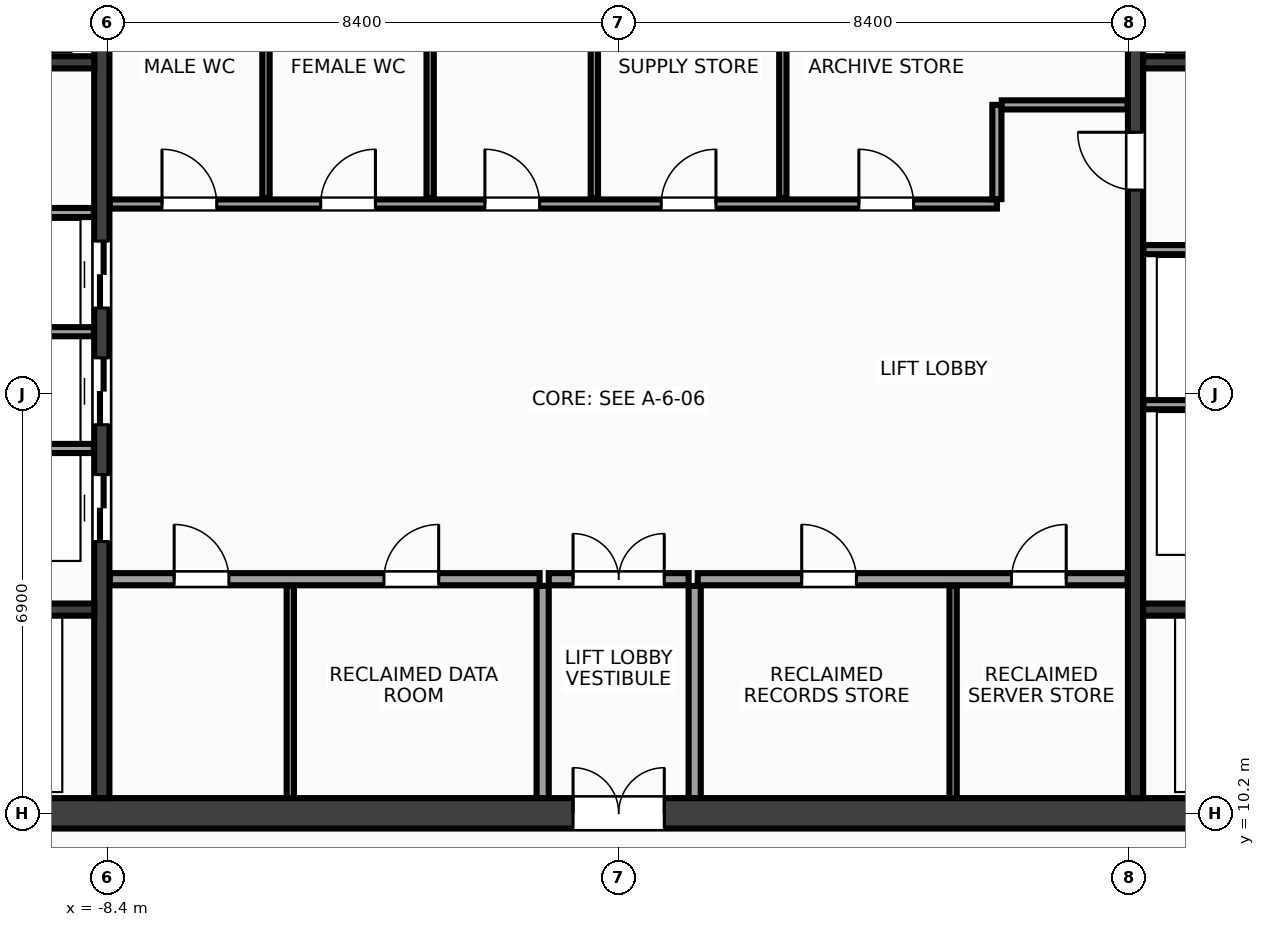
"""IFC4 building model, lengths in metres.
Left out: names, types, materials, properties, quantities, classifications, styles, units other than length and angle.
Written with IfcOpenShell. Run it as: python <this file> out.ifc"""

import sys

from ifc_helpers import new_model, si_unit, direction, frame, frame_2d, origin, place, context, subcontext, project, spatial, rectangle, extrude, source, transform, mapped, element, fill, save


model = new_model("IFC4")
c1 = context("Model", 3, precision=1e-05, world=origin(), true_north=direction((0.0, 1.0)))
c2 = subcontext(c1, "Body", "Model", "MODEL_VIEW")
j1 = project(units=[si_unit("LENGTHUNIT", "METRE"), si_unit("PLANEANGLEUNIT", "RADIAN")], contexts=[c1])
p1 = place(None, origin())
s1 = spatial("IfcSite", under=j1, at=p1, CompositionType="ELEMENT")
p2 = place(p1, origin())
s2 = spatial("IfcBuilding", under=s1, at=p2, CompositionType="ELEMENT")
p3 = place(p2, frame((0.0, 0.0, 257.6)))
s3 = spatial("IfcBuildingStorey", under=s2, at=p3, CompositionType="ELEMENT", Elevation=257.6)
m1 = source(origin(), c2, "Body", "SweptSolid", [
    extrude(rectangle(XDim=31.7, YDim=0.5, at=frame_2d((15.85, 0.0))), origin(), (0.0, 0.0, 1.0), 3.6),
])
p4 = place(p3, frame((-15.85, 10.2, 0.0), z_axis=(0.0, 0.0, 1.0), x_axis=(1.0, 0.0, 0.0)))
e1 = element("IfcWall", 1, at=p4, inside=s3, PredefinedType="SHEAR", context=c2, shape_type="MappedRepresentation", body=[
    mapped(m1, transform((0.0, 0.0, 0.0), x_axis=(1.0, 0.0, 0.0), y_axis=(0.0, 1.0, 0.0), z_axis=(0.0, 0.0, 1.0), scale=1.0)),
])
p5 = place(p4, frame((1.7, 0.0, 0.0)))
e2 = element("IfcOpeningElement", 2, at=p5, cuts=e1, PredefinedType="OPENING", context=c2, shape_type="SweptSolid", body=[
    extrude(rectangle(XDim=1.6, YDim=2.15, at=frame_2d((0.8, 1.075))), frame((0.0, 0.262, 0.0), z_axis=(0.0, -1.0, 0.0), x_axis=(1.0, 0.0, 0.0)), (0.0, 0.0, 1.0), 0.524),
])
p6 = place(p4, frame((28.4, 0.0, 0.0)))
e3 = element("IfcOpeningElement", 3, at=p6, cuts=e1, PredefinedType="OPENING", context=c2, shape_type="SweptSolid", body=[
    extrude(rectangle(XDim=1.6, YDim=2.15, at=frame_2d((0.8, 1.075))), frame((0.0, 0.262, 0.0), z_axis=(0.0, -1.0, 0.0), x_axis=(1.0, 0.0, 0.0)), (0.0, 0.0, 1.0), 0.524),
])
p7 = place(p4, frame((15.1, 0.0, 0.0)))
e4 = element("IfcOpeningElement", 4, at=p7, cuts=e1, PredefinedType="OPENING", context=c2, shape_type="SweptSolid", body=[
    extrude(rectangle(XDim=1.5, YDim=2.2, at=frame_2d((0.75, 1.1))), frame((0.0, 0.262, 0.0), z_axis=(0.0, -1.0, 0.0), x_axis=(1.0, 0.0, 0.0)), (0.0, 0.0, 1.0), 0.524),
])
m2 = source(origin(), c2, "Body", "SweptSolid", [
    extrude(rectangle(XDim=13.1, YDim=0.25, at=frame_2d((6.55, 0.0))), origin(), (0.0, 0.0, 1.0), 3.6),
])
p8 = place(p3, frame((-8.5, 10.45, 0.0), z_axis=(0.0, 0.0, 1.0), x_axis=(0.0, 1.0, 0.0)))
e5 = element("IfcWall", 5, at=p8, inside=s3, PredefinedType="SHEAR", context=c2, shape_type="MappedRepresentation", body=[
    mapped(m2, transform((0.0, 0.0, 0.0), x_axis=(1.0, 0.0, 0.0), y_axis=(0.0, 1.0, 0.0), z_axis=(0.0, 0.0, 1.0), scale=1.0)),
])
p9 = place(p8, frame((4.22, 0.0, 0.0)))
e6 = element("IfcOpeningElement", 6, at=p9, cuts=e5, PredefinedType="OPENING", context=c2, shape_type="SweptSolid", body=[
    extrude(rectangle(XDim=1.1, YDim=2.15, at=frame_2d((0.55, 1.075))), frame((0.0, 0.137, 0.0), z_axis=(0.0, -1.0, 0.0), x_axis=(1.0, 0.0, 0.0)), (0.0, 0.0, 1.0), 0.274),
])
p10 = place(p8, frame((6.14, 0.0, 0.0)))
e7 = element("IfcOpeningElement", 7, at=p10, cuts=e5, PredefinedType="OPENING", context=c2, shape_type="SweptSolid", body=[
    extrude(rectangle(XDim=1.1, YDim=2.15, at=frame_2d((0.55, 1.075))), frame((0.0, 0.137, 0.0), z_axis=(0.0, -1.0, 0.0), x_axis=(1.0, 0.0, 0.0)), (0.0, 0.0, 1.0), 0.274),
])
p11 = place(p8, frame((8.06, 0.0, 0.0)))
e8 = element("IfcOpeningElement", 8, at=p11, cuts=e5, PredefinedType="OPENING", context=c2, shape_type="SweptSolid", body=[
    extrude(rectangle(XDim=1.1, YDim=2.15, at=frame_2d((0.55, 1.075))), frame((0.0, 0.137, 0.0), z_axis=(0.0, -1.0, 0.0), x_axis=(1.0, 0.0, 0.0)), (0.0, 0.0, 1.0), 0.274),
])
p12 = place(p3, frame((8.5, 10.45, 0.0), z_axis=(0.0, 0.0, 1.0), x_axis=(0.0, 1.0, 0.0)))
e9 = element("IfcWall", 9, at=p12, inside=s3, PredefinedType="SHEAR", context=c2, shape_type="MappedRepresentation", body=[
    mapped(m2, transform((0.0, 0.0, 0.0), x_axis=(1.0, 0.0, 0.0), y_axis=(0.0, 1.0, 0.0), z_axis=(0.0, 0.0, 1.0), scale=1.0)),
])
p13 = place(p12, frame((10.0, 0.0, 0.0)))
e10 = element("IfcOpeningElement", 10, at=p13, cuts=e9, PredefinedType="OPENING", context=c2, shape_type="SweptSolid", body=[
    extrude(rectangle(XDim=0.95, YDim=2.15, at=frame_2d((0.475, 1.075))), frame((0.0, 0.137, 0.0), z_axis=(0.0, -1.0, 0.0), x_axis=(1.0, 0.0, 0.0)), (0.0, 0.0, 1.0), 0.274),
])
m3 = source(origin(), c2, "Body", "SweptSolid", [
    extrude(rectangle(XDim=2.825, YDim=0.2, at=frame_2d((1.413, 0.0))), origin(), (0.0, 0.0, 1.0), 3.6),
])
for number, where, z_axis, x_axis in (
    (11, (-11.45, 13.55, 0.0), (0.0, 0.0, 1.0), (1.0, 0.0, 0.0)),
    (12, (8.625, 13.55, 0.0), (0.0, 0.0, 1.0), (1.0, 0.0, 0.0)),
):
    element("IfcWall", number, at=place(p3, frame(where, z_axis=z_axis, x_axis=x_axis)), inside=s3, PredefinedType="SHEAR", context=c2, shape_type="MappedRepresentation", body=[
        mapped(m3, transform((0.0, 0.0, 0.0), x_axis=(1.0, 0.0, 0.0), y_axis=(0.0, 1.0, 0.0), z_axis=(0.0, 0.0, 1.0), scale=1.0)),
    ])
m4 = source(origin(), c2, "Body", "SweptSolid", [
    extrude(rectangle(XDim=3.02, YDim=0.2, at=frame_2d((1.51, 0.0))), origin(), (0.0, 0.0, 1.0), 3.6),
])
for number, where, z_axis, x_axis in (
    (13, (-11.645, 22.55, 0.0), (0.0, 0.0, 1.0), (1.0, 0.0, 0.0)),
    (14, (8.625, 22.55, 0.0), (0.0, 0.0, 1.0), (1.0, 0.0, 0.0)),
):
    element("IfcWall", number, at=place(p3, frame(where, z_axis=z_axis, x_axis=x_axis)), inside=s3, PredefinedType="SHEAR", context=c2, shape_type="MappedRepresentation", body=[
        mapped(m4, transform((0.0, 0.0, 0.0), x_axis=(1.0, 0.0, 0.0), y_axis=(0.0, 1.0, 0.0), z_axis=(0.0, 0.0, 1.0), scale=1.0)),
    ])
m5 = source(origin(), c2, "Body", "SweptSolid", [
    extrude(rectangle(XDim=3.01, YDim=0.15, at=frame_2d((1.505, 0.0))), origin(), (0.0, 0.0, 1.0), 3.37),
])
for number, where, z_axis, x_axis in (
    (15, (-11.64, 16.2, 0.0), (0.0, 0.0, 1.0), (1.0, 0.0, 0.0)),
    (16, (-11.64, 18.12, 0.0), (0.0, 0.0, 1.0), (1.0, 0.0, 0.0)),
    (17, (-11.64, 20.08, 0.0), (0.0, 0.0, 1.0), (1.0, 0.0, 0.0)),
    (18, (8.63, 16.92, 0.0), (0.0, 0.0, 1.0), (1.0, 0.0, 0.0)),
    (19, (8.63, 19.47, 0.0), (0.0, 0.0, 1.0), (1.0, 0.0, 0.0)),
):
    element("IfcWall", number, at=place(p3, frame(where, z_axis=z_axis, x_axis=x_axis)), inside=s3, PredefinedType="PARTITIONING", context=c2, shape_type="MappedRepresentation", body=[
        mapped(m5, transform((0.0, 0.0, 0.0), x_axis=(1.0, 0.0, 0.0), y_axis=(0.0, 1.0, 0.0), z_axis=(0.0, 0.0, 1.0), scale=1.0)),
    ])
m6 = source(origin(), c2, "Body", "SweptSolid", [
    extrude(rectangle(XDim=7.07, YDim=0.2, at=frame_2d((3.535, 0.0))), origin(), (0.0, 0.0, 1.0), 3.37),
])
p14 = place(p3, frame((-8.37, 14.05, 0.0), z_axis=(0.0, 0.0, 1.0), x_axis=(1.0, 0.0, 0.0)))
e20 = element("IfcWall", 20, at=p14, inside=s3, PredefinedType="PARTITIONING", context=c2, shape_type="MappedRepresentation", body=[
    mapped(m6, transform((0.0, 0.0, 0.0), x_axis=(1.0, 0.0, 0.0), y_axis=(0.0, 1.0, 0.0), z_axis=(0.0, 0.0, 1.0), scale=1.0)),
])
p15 = place(p14, frame((1.06, 0.0, 0.0)))
e21 = element("IfcOpeningElement", 21, at=p15, cuts=e20, PredefinedType="OPENING", context=c2, shape_type="SweptSolid", body=[
    extrude(rectangle(XDim=0.9, YDim=2.15, at=frame_2d((0.45, 1.075))), frame((0.0, 0.112, 0.0), z_axis=(0.0, -1.0, 0.0), x_axis=(1.0, 0.0, 0.0)), (0.0, 0.0, 1.0), 0.224),
])
p16 = place(p14, frame((4.51, 0.0, 0.0)))
e22 = element("IfcOpeningElement", 22, at=p16, cuts=e20, PredefinedType="OPENING", context=c2, shape_type="SweptSolid", body=[
    extrude(rectangle(XDim=0.9, YDim=2.15, at=frame_2d((0.45, 1.075))), frame((0.0, 0.112, 0.0), z_axis=(0.0, -1.0, 0.0), x_axis=(1.0, 0.0, 0.0)), (0.0, 0.0, 1.0), 0.224),
])
p17 = place(p3, frame((1.3, 14.05, 0.0), z_axis=(0.0, 0.0, 1.0), x_axis=(1.0, 0.0, 0.0)))
e23 = element("IfcWall", 23, at=p17, inside=s3, PredefinedType="PARTITIONING", context=c2, shape_type="MappedRepresentation", body=[
    mapped(m6, transform((0.0, 0.0, 0.0), x_axis=(1.0, 0.0, 0.0), y_axis=(0.0, 1.0, 0.0), z_axis=(0.0, 0.0, 1.0), scale=1.0)),
])
p18 = place(p17, frame((1.71, 0.0, 0.0)))
e24 = element("IfcOpeningElement", 24, at=p18, cuts=e23, PredefinedType="OPENING", context=c2, shape_type="SweptSolid", body=[
    extrude(rectangle(XDim=0.9, YDim=2.15, at=frame_2d((0.45, 1.075))), frame((0.0, 0.112, 0.0), z_axis=(0.0, -1.0, 0.0), x_axis=(1.0, 0.0, 0.0)), (0.0, 0.0, 1.0), 0.224),
])
p19 = place(p17, frame((5.16, 0.0, 0.0)))
e25 = element("IfcOpeningElement", 25, at=p19, cuts=e23, PredefinedType="OPENING", context=c2, shape_type="SweptSolid", body=[
    extrude(rectangle(XDim=0.9, YDim=2.15, at=frame_2d((0.45, 1.075))), frame((0.0, 0.112, 0.0), z_axis=(0.0, -1.0, 0.0), x_axis=(1.0, 0.0, 0.0)), (0.0, 0.0, 1.0), 0.224),
])
m7 = source(origin(), c2, "Body", "SweptSolid", [
    extrude(rectangle(XDim=3.49, YDim=0.2, at=frame_2d((1.745, 0.0))), origin(), (0.0, 0.0, 1.0), 3.37),
])
for number, where, z_axis, x_axis in (
    (26, (-1.25, 10.45, 0.0), (0.0, 0.0, 1.0), (0.0, 1.0, 0.0)),
    (27, (1.25, 10.45, 0.0), (0.0, 0.0, 1.0), (0.0, 1.0, 0.0)),
):
    element("IfcWall", number, at=place(p3, frame(where, z_axis=z_axis, x_axis=x_axis)), inside=s3, PredefinedType="PARTITIONING", context=c2, shape_type="MappedRepresentation", body=[
        mapped(m7, transform((0.0, 0.0, 0.0), x_axis=(1.0, 0.0, 0.0), y_axis=(0.0, 1.0, 0.0), z_axis=(0.0, 0.0, 1.0), scale=1.0)),
    ])
m8 = source(origin(), c2, "Body", "SweptSolid", [
    extrude(rectangle(XDim=2.3, YDim=0.2, at=frame_2d((1.15, 0.0))), origin(), (0.0, 0.0, 1.0), 3.37),
])
p20 = place(p3, frame((-1.15, 14.05, 0.0), z_axis=(0.0, 0.0, 1.0), x_axis=(1.0, 0.0, 0.0)))
e28 = element("IfcWall", 28, at=p20, inside=s3, PredefinedType="PARTITIONING", context=c2, shape_type="MappedRepresentation", body=[
    mapped(m8, transform((0.0, 0.0, 0.0), x_axis=(1.0, 0.0, 0.0), y_axis=(0.0, 1.0, 0.0), z_axis=(0.0, 0.0, 1.0), scale=1.0)),
])
p21 = place(p20, frame((0.4, 0.0, 0.0)))
e29 = element("IfcOpeningElement", 29, at=p21, cuts=e28, PredefinedType="OPENING", context=c2, shape_type="SweptSolid", body=[
    extrude(rectangle(XDim=1.5, YDim=2.2, at=frame_2d((0.75, 1.1))), frame((0.0, 0.112, 0.0), z_axis=(0.0, -1.0, 0.0), x_axis=(1.0, 0.0, 0.0)), (0.0, 0.0, 1.0), 0.224),
])
m9 = source(origin(), c2, "Body", "SweptSolid", [
    extrude(rectangle(XDim=14.59, YDim=0.15, at=frame_2d((7.295, 0.0))), origin(), (0.0, 0.0, 1.0), 3.37),
])
p22 = place(p3, frame((-8.37, 20.22, 0.0), z_axis=(0.0, 0.0, 1.0), x_axis=(1.0, 0.0, 0.0)))
e30 = element("IfcWall", 30, at=p22, inside=s3, PredefinedType="PARTITIONING", context=c2, shape_type="MappedRepresentation", body=[
    mapped(m9, transform((0.0, 0.0, 0.0), x_axis=(1.0, 0.0, 0.0), y_axis=(0.0, 1.0, 0.0), z_axis=(0.0, 0.0, 1.0), scale=1.0)),
])
p23 = place(p22, frame((0.86, 0.0, 0.0)))
e31 = element("IfcOpeningElement", 31, at=p23, cuts=e30, PredefinedType="OPENING", context=c2, shape_type="SweptSolid", body=[
    extrude(rectangle(XDim=0.9, YDim=2.15, at=frame_2d((0.45, 1.075))), frame((0.0, 0.087, 0.0), z_axis=(0.0, -1.0, 0.0), x_axis=(1.0, 0.0, 0.0)), (0.0, 0.0, 1.0), 0.174),
])
p24 = place(p22, frame((3.47, 0.0, 0.0)))
e32 = element("IfcOpeningElement", 32, at=p24, cuts=e30, PredefinedType="OPENING", context=c2, shape_type="SweptSolid", body=[
    extrude(rectangle(XDim=0.9, YDim=2.15, at=frame_2d((0.45, 1.075))), frame((0.0, 0.087, 0.0), z_axis=(0.0, -1.0, 0.0), x_axis=(1.0, 0.0, 0.0)), (0.0, 0.0, 1.0), 0.174),
])
p25 = place(p22, frame((6.17, 0.0, 0.0)))
e33 = element("IfcOpeningElement", 33, at=p25, cuts=e30, PredefinedType="OPENING", context=c2, shape_type="SweptSolid", body=[
    extrude(rectangle(XDim=0.9, YDim=2.15, at=frame_2d((0.45, 1.075))), frame((0.0, 0.087, 0.0), z_axis=(0.0, -1.0, 0.0), x_axis=(1.0, 0.0, 0.0)), (0.0, 0.0, 1.0), 0.174),
])
p26 = place(p22, frame((9.07, 0.0, 0.0)))
e34 = element("IfcOpeningElement", 34, at=p26, cuts=e30, PredefinedType="OPENING", context=c2, shape_type="SweptSolid", body=[
    extrude(rectangle(XDim=0.9, YDim=2.15, at=frame_2d((0.45, 1.075))), frame((0.0, 0.087, 0.0), z_axis=(0.0, -1.0, 0.0), x_axis=(1.0, 0.0, 0.0)), (0.0, 0.0, 1.0), 0.174),
])
p27 = place(p22, frame((12.32, 0.0, 0.0)))
e35 = element("IfcOpeningElement", 35, at=p27, cuts=e30, PredefinedType="OPENING", context=c2, shape_type="SweptSolid", body=[
    extrude(rectangle(XDim=0.9, YDim=2.15, at=frame_2d((0.45, 1.075))), frame((0.0, 0.087, 0.0), z_axis=(0.0, -1.0, 0.0), x_axis=(1.0, 0.0, 0.0)), (0.0, 0.0, 1.0), 0.174),
])
m10 = source(origin(), c2, "Body", "SweptSolid", [
    extrude(rectangle(XDim=1.55, YDim=0.15, at=frame_2d((0.775, 0.0))), origin(), (0.0, 0.0, 1.0), 3.37),
])
p28 = place(p3, frame((6.22, 20.3, 0.0), z_axis=(0.0, 0.0, 1.0), x_axis=(0.0, 1.0, 0.0)))
e36 = element("IfcWall", 36, at=p28, inside=s3, PredefinedType="PARTITIONING", context=c2, shape_type="MappedRepresentation", body=[
    mapped(m10, transform((0.0, 0.0, 0.0), x_axis=(1.0, 0.0, 0.0), y_axis=(0.0, 1.0, 0.0), z_axis=(0.0, 0.0, 1.0), scale=1.0)),
])
m11 = source(origin(), c2, "Body", "SweptSolid", [
    extrude(rectangle(XDim=2.07, YDim=0.15, at=frame_2d((1.035, 0.0))), origin(), (0.0, 0.0, 1.0), 3.37),
])
p29 = place(p3, frame((6.3, 21.85, 0.0), z_axis=(0.0, 0.0, 1.0), x_axis=(1.0, 0.0, 0.0)))
e37 = element("IfcWall", 37, at=p29, inside=s3, PredefinedType="PARTITIONING", context=c2, shape_type="MappedRepresentation", body=[
    mapped(m11, transform((0.0, 0.0, 0.0), x_axis=(1.0, 0.0, 0.0), y_axis=(0.0, 1.0, 0.0), z_axis=(0.0, 0.0, 1.0), scale=1.0)),
])
m12 = source(origin(), c2, "Body", "SweptSolid", [
    extrude(rectangle(XDim=3.49, YDim=0.12, at=frame_2d((1.745, 0.0))), origin(), (0.0, 0.0, 1.0), 3.37),
])
for number, where, z_axis, x_axis in (
    (38, (-5.4, 10.45, 0.0), (0.0, 0.0, 1.0), (0.0, 1.0, 0.0)),
    (39, (5.5, 10.45, 0.0), (0.0, 0.0, 1.0), (0.0, 1.0, 0.0)),
):
    element("IfcWall", number, at=place(p3, frame(where, z_axis=z_axis, x_axis=x_axis)), inside=s3, PredefinedType="PARTITIONING", context=c2, shape_type="MappedRepresentation", body=[
        mapped(m12, transform((0.0, 0.0, 0.0), x_axis=(1.0, 0.0, 0.0), y_axis=(0.0, 1.0, 0.0), z_axis=(0.0, 0.0, 1.0), scale=1.0)),
    ])
m13 = source(origin(), c2, "Body", "SweptSolid", [
    extrude(rectangle(XDim=3.19, YDim=0.12, at=frame_2d((1.595, 0.0))), origin(), (0.0, 0.0, 1.0), 3.37),
])
for number, where, z_axis, x_axis in (
    (40, (-5.8, 20.32, 0.0), (0.0, 0.0, 1.0), (0.0, 1.0, 0.0)),
    (41, (-3.1, 20.32, 0.0), (0.0, 0.0, 1.0), (0.0, 1.0, 0.0)),
    (42, (-0.4, 20.32, 0.0), (0.0, 0.0, 1.0), (0.0, 1.0, 0.0)),
    (43, (2.7, 20.32, 0.0), (0.0, 0.0, 1.0), (0.0, 1.0, 0.0)),
):
    element("IfcWall", number, at=place(p3, frame(where, z_axis=z_axis, x_axis=x_axis)), inside=s3, PredefinedType="PARTITIONING", context=c2, shape_type="MappedRepresentation", body=[
        mapped(m13, transform((0.0, 0.0, 0.0), x_axis=(1.0, 0.0, 0.0), y_axis=(0.0, 1.0, 0.0), z_axis=(0.0, 0.0, 1.0), scale=1.0)),
    ])
m14 = source(origin(), c2, "Body", "SweptSolid", [
    extrude(rectangle(XDim=1.1, YDim=2.15, at=frame_2d((0.55, 1.075))), frame((0.0, 0.025, 0.0), z_axis=(0.0, -1.0, 0.0), x_axis=(1.0, 0.0, 0.0)), (0.0, 0.0, 1.0), 0.05),
])
p30 = place(p9, origin())
e44 = element("IfcDoor", 44, at=p30, inside=s3, OperationType="DOUBLE_DOOR_SLIDING", PredefinedType="DOOR", context=c2, shape_type="MappedRepresentation", body=[
    mapped(m14, transform((0.0, 0.0, 0.0), x_axis=(1.0, 0.0, 0.0), y_axis=(0.0, 1.0, 0.0), z_axis=(0.0, 0.0, 1.0), scale=1.0)),
])
fill(e6, e44)
p31 = place(p10, origin())
e45 = element("IfcDoor", 45, at=p31, inside=s3, OperationType="DOUBLE_DOOR_SLIDING", PredefinedType="DOOR", context=c2, shape_type="MappedRepresentation", body=[
    mapped(m14, transform((0.0, 0.0, 0.0), x_axis=(1.0, 0.0, 0.0), y_axis=(0.0, 1.0, 0.0), z_axis=(0.0, 0.0, 1.0), scale=1.0)),
])
fill(e7, e45)
p32 = place(p11, origin())
e46 = element("IfcDoor", 46, at=p32, inside=s3, OperationType="DOUBLE_DOOR_SLIDING", PredefinedType="DOOR", context=c2, shape_type="MappedRepresentation", body=[
    mapped(m14, transform((0.0, 0.0, 0.0), x_axis=(1.0, 0.0, 0.0), y_axis=(0.0, 1.0, 0.0), z_axis=(0.0, 0.0, 1.0), scale=1.0)),
])
fill(e8, e46)
m15 = source(origin(), c2, "Body", "SweptSolid", [
    extrude(rectangle(XDim=0.95, YDim=2.15, at=frame_2d((0.475, 1.075))), frame((0.0, 0.025, 0.0), z_axis=(0.0, -1.0, 0.0), x_axis=(1.0, 0.0, 0.0)), (0.0, 0.0, 1.0), 0.05),
])
p33 = place(p13, origin())
e47 = element("IfcDoor", 47, at=p33, inside=s3, OperationType="SINGLE_SWING_RIGHT", PredefinedType="DOOR", context=c2, shape_type="MappedRepresentation", body=[
    mapped(m15, transform((0.0, 0.0, 0.0), x_axis=(1.0, 0.0, 0.0), y_axis=(0.0, 1.0, 0.0), z_axis=(0.0, 0.0, 1.0), scale=1.0)),
])
fill(e10, e47)
m16 = source(origin(), c2, "Body", "SweptSolid", [
    extrude(rectangle(XDim=0.9, YDim=2.15, at=frame_2d((0.45, 1.075))), frame((0.0, 0.025, 0.0), z_axis=(0.0, -1.0, 0.0), x_axis=(1.0, 0.0, 0.0)), (0.0, 0.0, 1.0), 0.05),
])
p34 = place(p15, origin())
e48 = element("IfcDoor", 48, at=p34, inside=s3, OperationType="SINGLE_SWING_LEFT", PredefinedType="DOOR", context=c2, shape_type="MappedRepresentation", body=[
    mapped(m16, transform((0.0, 0.0, 0.0), x_axis=(1.0, 0.0, 0.0), y_axis=(0.0, 1.0, 0.0), z_axis=(0.0, 0.0, 1.0), scale=1.0)),
])
fill(e21, e48)
p35 = place(p16, origin())
e49 = element("IfcDoor", 49, at=p35, inside=s3, OperationType="SINGLE_SWING_RIGHT", PredefinedType="DOOR", context=c2, shape_type="MappedRepresentation", body=[
    mapped(m16, transform((0.0, 0.0, 0.0), x_axis=(1.0, 0.0, 0.0), y_axis=(0.0, 1.0, 0.0), z_axis=(0.0, 0.0, 1.0), scale=1.0)),
])
fill(e22, e49)
p36 = place(p18, origin())
e50 = element("IfcDoor", 50, at=p36, inside=s3, OperationType="SINGLE_SWING_LEFT", PredefinedType="DOOR", context=c2, shape_type="MappedRepresentation", body=[
    mapped(m16, transform((0.0, 0.0, 0.0), x_axis=(1.0, 0.0, 0.0), y_axis=(0.0, 1.0, 0.0), z_axis=(0.0, 0.0, 1.0), scale=1.0)),
])
fill(e24, e50)
p37 = place(p19, origin())
e51 = element("IfcDoor", 51, at=p37, inside=s3, OperationType="SINGLE_SWING_RIGHT", PredefinedType="DOOR", context=c2, shape_type="MappedRepresentation", body=[
    mapped(m16, transform((0.0, 0.0, 0.0), x_axis=(1.0, 0.0, 0.0), y_axis=(0.0, 1.0, 0.0), z_axis=(0.0, 0.0, 1.0), scale=1.0)),
])
fill(e25, e51)
m17 = source(origin(), c2, "Body", "SweptSolid", [
    extrude(rectangle(XDim=1.5, YDim=2.2, at=frame_2d((0.75, 1.1))), frame((0.0, 0.025, 0.0), z_axis=(0.0, -1.0, 0.0), x_axis=(1.0, 0.0, 0.0)), (0.0, 0.0, 1.0), 0.05),
])
p38 = place(p21, origin())
e52 = element("IfcDoor", 52, at=p38, inside=s3, OperationType="DOUBLE_DOOR_SINGLE_SWING", PredefinedType="DOOR", context=c2, shape_type="MappedRepresentation", body=[
    mapped(m17, transform((0.0, 0.0, 0.0), x_axis=(1.0, 0.0, 0.0), y_axis=(0.0, 1.0, 0.0), z_axis=(0.0, 0.0, 1.0), scale=1.0)),
])
fill(e29, e52)
p39 = place(p7, origin())
e53 = element("IfcDoor", 53, at=p39, inside=s3, OperationType="DOUBLE_DOOR_SINGLE_SWING", PredefinedType="DOOR", context=c2, shape_type="MappedRepresentation", body=[
    mapped(m17, transform((0.0, 0.0, 0.0), x_axis=(1.0, 0.0, 0.0), y_axis=(0.0, 1.0, 0.0), z_axis=(0.0, 0.0, 1.0), scale=1.0)),
])
fill(e4, e53)
p40 = place(p23, origin())
e54 = element("IfcDoor", 54, at=p40, inside=s3, OperationType="SINGLE_SWING_LEFT", PredefinedType="DOOR", context=c2, shape_type="MappedRepresentation", body=[
    mapped(m16, transform((0.0, 0.0, 0.0), x_axis=(1.0, 0.0, 0.0), y_axis=(0.0, 1.0, 0.0), z_axis=(0.0, 0.0, 1.0), scale=1.0)),
])
fill(e31, e54)
p41 = place(p24, origin())
e55 = element("IfcDoor", 55, at=p41, inside=s3, OperationType="SINGLE_SWING_RIGHT", PredefinedType="DOOR", context=c2, shape_type="MappedRepresentation", body=[
    mapped(m16, transform((0.0, 0.0, 0.0), x_axis=(1.0, 0.0, 0.0), y_axis=(0.0, 1.0, 0.0), z_axis=(0.0, 0.0, 1.0), scale=1.0)),
])
fill(e32, e55)
p42 = place(p25, origin())
e56 = element("IfcDoor", 56, at=p42, inside=s3, OperationType="SINGLE_SWING_LEFT", PredefinedType="DOOR", context=c2, shape_type="MappedRepresentation", body=[
    mapped(m16, transform((0.0, 0.0, 0.0), x_axis=(1.0, 0.0, 0.0), y_axis=(0.0, 1.0, 0.0), z_axis=(0.0, 0.0, 1.0), scale=1.0)),
])
fill(e33, e56)
p43 = place(p26, origin())
e57 = element("IfcDoor", 57, at=p43, inside=s3, OperationType="SINGLE_SWING_RIGHT", PredefinedType="DOOR", context=c2, shape_type="MappedRepresentation", body=[
    mapped(m16, transform((0.0, 0.0, 0.0), x_axis=(1.0, 0.0, 0.0), y_axis=(0.0, 1.0, 0.0), z_axis=(0.0, 0.0, 1.0), scale=1.0)),
])
fill(e34, e57)
p44 = place(p27, origin())
e58 = element("IfcDoor", 58, at=p44, inside=s3, OperationType="SINGLE_SWING_LEFT", PredefinedType="DOOR", context=c2, shape_type="MappedRepresentation", body=[
    mapped(m16, transform((0.0, 0.0, 0.0), x_axis=(1.0, 0.0, 0.0), y_axis=(0.0, 1.0, 0.0), z_axis=(0.0, 0.0, 1.0), scale=1.0)),
])
fill(e35, e58)
save(model, sys.argv[1])
